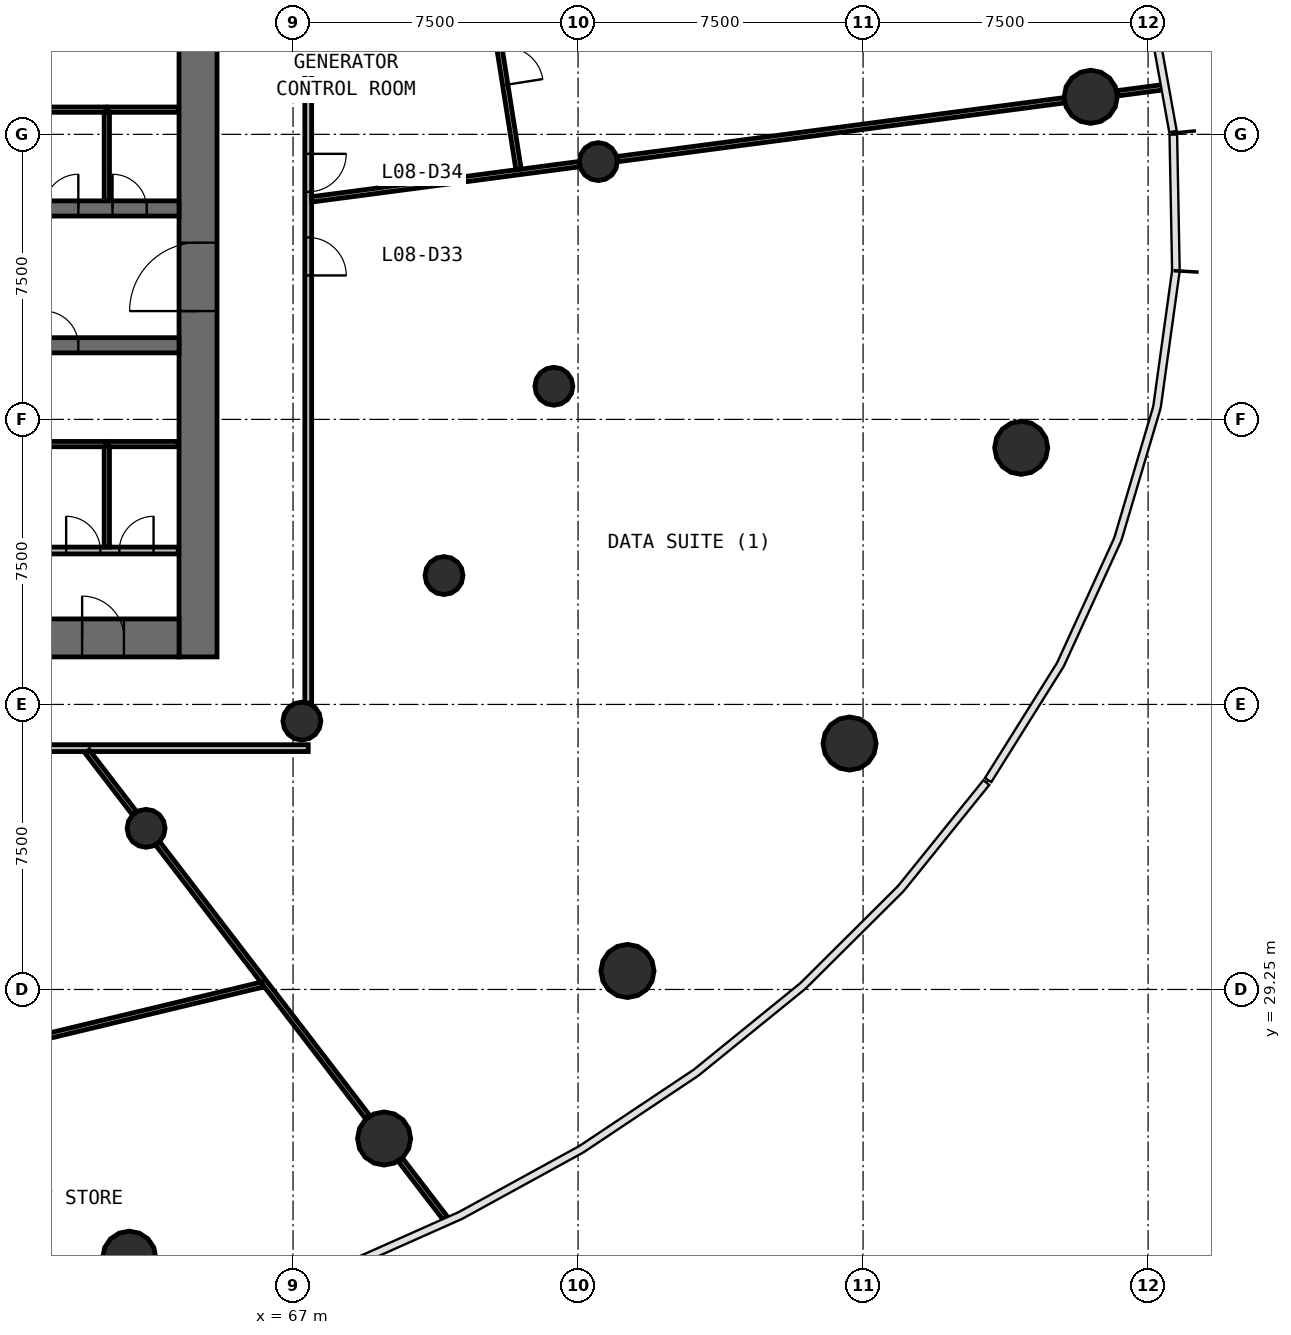
"""IFC4 building model, lengths in metres.
Left out: names, types, materials, properties, quantities, classifications, styles, units other than length and angle.
Written with IfcOpenShell. Run it as: python <this file> out.ifc"""

import sys

from ifc_helpers import new_model, si_unit, direction, frame, frame_2d, origin, origin_2d, place, context, subcontext, project, spatial, rectangle, circle, extrude, source, transform, mapped, element, fill, save


model = new_model("IFC4")
c1 = context("Model", 3, precision=1e-05, world=origin(), true_north=direction((0.0, 1.0)))
c2 = subcontext(c1, "Body", "Model", "MODEL_VIEW")
j1 = project(units=[si_unit("LENGTHUNIT", "METRE"), si_unit("PLANEANGLEUNIT", "RADIAN")], contexts=[c1])
p1 = place(None, origin())
s1 = spatial("IfcSite", under=j1, at=p1, CompositionType="ELEMENT")
p2 = place(p1, origin())
s2 = spatial("IfcBuilding", under=s1, at=p2, CompositionType="ELEMENT")
p3 = place(p2, frame((0.0, 0.0, 35.8)))
s3 = spatial("IfcBuildingStorey", under=s2, at=p3, CompositionType="ELEMENT", Elevation=35.8)
p4 = place(p3, frame((64.5, 38.0, 0.0), z_axis=(0.0, 0.0, 1.0), x_axis=(0.0, 1.0, 0.0)))
e1 = element("IfcWall", 1, at=p4, inside=s3, PredefinedType="SHEAR", context=c2, shape_type="SweptSolid", body=[
    extrude(rectangle(XDim=20.0, YDim=1.0, at=frame_2d((10.0, 0.0))), origin(), (0.0, 0.0, 1.0), 4.4),
])
p5 = place(p4, frame((9.1, 0.0, 0.0)))
e2 = element("IfcOpeningElement", 2, at=p5, cuts=e1, PredefinedType="OPENING", context=c2, shape_type="SweptSolid", body=[
    extrude(rectangle(XDim=1.8, YDim=2.1, at=frame_2d((0.9, 1.05))), frame((0.0, 0.51, 0.0), z_axis=(0.0, -1.0, 0.0), x_axis=(1.0, 0.0, 0.0)), (0.0, 0.0, 1.0), 1.02),
])
p6 = place(p3, frame((40.0, 38.5, 0.0), z_axis=(0.0, 0.0, 1.0), x_axis=(1.0, 0.0, 0.0)))
e3 = element("IfcWall", 3, at=p6, inside=s3, PredefinedType="SHEAR", context=c2, shape_type="SweptSolid", body=[
    extrude(rectangle(XDim=24.0, YDim=1.0, at=frame_2d((12.0, 0.0))), origin(), (0.0, 0.0, 1.0), 4.4),
])
p7 = place(p6, frame((21.45, 0.0, 0.0)))
e4 = element("IfcOpeningElement", 4, at=p7, cuts=e3, PredefinedType="OPENING", context=c2, shape_type="SweptSolid", body=[
    extrude(rectangle(XDim=1.1, YDim=2.1, at=frame_2d((0.55, 1.05))), frame((0.0, 0.51, 0.0), z_axis=(0.0, -1.0, 0.0), x_axis=(1.0, 0.0, 0.0)), (0.0, 0.0, 1.0), 1.02),
])
p8 = place(p6, frame((1.95, 0.0, 0.0)))
e5 = element("IfcOpeningElement", 5, at=p8, cuts=e3, PredefinedType="OPENING", context=c2, shape_type="SweptSolid", body=[
    extrude(rectangle(XDim=1.1, YDim=2.1, at=frame_2d((0.55, 1.05))), frame((0.0, 0.51, 0.0), z_axis=(0.0, -1.0, 0.0), x_axis=(1.0, 0.0, 0.0)), (0.0, 0.0, 1.0), 1.02),
])
p9 = place(p3, frame((40.0, 49.8, 0.0), z_axis=(0.0, 0.0, 1.0), x_axis=(1.0, 0.0, 0.0)))
e6 = element("IfcWall", 6, at=p9, inside=s3, PredefinedType="SHEAR", context=c2, shape_type="SweptSolid", body=[
    extrude(rectangle(XDim=24.0, YDim=0.4, at=frame_2d((12.0, 0.0))), origin(), (0.0, 0.0, 1.0), 4.4),
])
p10 = place(p9, frame((4.5, 0.0, 0.0)))
e7 = element("IfcOpeningElement", 7, at=p10, cuts=e6, PredefinedType="OPENING", context=c2, shape_type="SweptSolid", body=[
    extrude(rectangle(XDim=1.1, YDim=2.1, at=frame_2d((0.55, 1.05))), frame((0.0, 0.21, 0.0), z_axis=(0.0, -1.0, 0.0), x_axis=(1.0, 0.0, 0.0)), (0.0, 0.0, 1.0), 0.42),
])
p11 = place(p9, frame((7.0, 0.0, 0.0)))
e8 = element("IfcOpeningElement", 8, at=p11, cuts=e6, PredefinedType="OPENING", context=c2, shape_type="SweptSolid", body=[
    extrude(rectangle(XDim=1.1, YDim=2.1, at=frame_2d((0.55, 1.05))), frame((0.0, 0.21, 0.0), z_axis=(0.0, -1.0, 0.0), x_axis=(1.0, 0.0, 0.0)), (0.0, 0.0, 1.0), 0.42),
])
p12 = place(p9, frame((9.5, 0.0, 0.0)))
e9 = element("IfcOpeningElement", 9, at=p12, cuts=e6, PredefinedType="OPENING", context=c2, shape_type="SweptSolid", body=[
    extrude(rectangle(XDim=1.1, YDim=2.1, at=frame_2d((0.55, 1.05))), frame((0.0, 0.21, 0.0), z_axis=(0.0, -1.0, 0.0), x_axis=(1.0, 0.0, 0.0)), (0.0, 0.0, 1.0), 0.42),
])
p13 = place(p9, frame((0.9, 0.0, 0.0)))
e10 = element("IfcOpeningElement", 10, at=p13, cuts=e6, PredefinedType="OPENING", context=c2, shape_type="SweptSolid", body=[
    extrude(rectangle(XDim=1.8, YDim=2.4, at=frame_2d((0.9, 1.2))), frame((0.0, 0.21, 0.0), z_axis=(0.0, -1.0, 0.0), x_axis=(1.0, 0.0, 0.0)), (0.0, 0.0, 1.0), 0.42),
])
p14 = place(p9, frame((20.45, 0.0, 0.0)))
e11 = element("IfcOpeningElement", 11, at=p14, cuts=e6, PredefinedType="OPENING", context=c2, shape_type="SweptSolid", body=[
    extrude(rectangle(XDim=0.9, YDim=2.1, at=frame_2d((0.45, 1.05))), frame((0.0, 0.21, 0.0), z_axis=(0.0, -1.0, 0.0), x_axis=(1.0, 0.0, 0.0)), (0.0, 0.0, 1.0), 0.42),
])
p15 = place(p9, frame((22.25, 0.0, 0.0)))
e12 = element("IfcOpeningElement", 12, at=p15, cuts=e6, PredefinedType="OPENING", context=c2, shape_type="SweptSolid", body=[
    extrude(rectangle(XDim=0.9, YDim=2.1, at=frame_2d((0.45, 1.05))), frame((0.0, 0.21, 0.0), z_axis=(0.0, -1.0, 0.0), x_axis=(1.0, 0.0, 0.0)), (0.0, 0.0, 1.0), 0.42),
])
p16 = place(p9, frame((11.65, 0.0, 0.0)))
e13 = element("IfcOpeningElement", 13, at=p16, cuts=e6, PredefinedType="OPENING", context=c2, shape_type="SweptSolid", body=[
    extrude(rectangle(XDim=0.9, YDim=2.1, at=frame_2d((0.45, 1.05))), frame((0.0, 0.21, 0.0), z_axis=(0.0, -1.0, 0.0), x_axis=(1.0, 0.0, 0.0)), (0.0, 0.0, 1.0), 0.42),
])
p17 = place(p3, frame((40.0, 46.2, 0.0), z_axis=(0.0, 0.0, 1.0), x_axis=(1.0, 0.0, 0.0)))
e14 = element("IfcWall", 14, at=p17, inside=s3, PredefinedType="SHEAR", context=c2, shape_type="SweptSolid", body=[
    extrude(rectangle(XDim=24.0, YDim=0.4, at=frame_2d((12.0, 0.0))), origin(), (0.0, 0.0, 1.0), 4.4),
])
p18 = place(p17, frame((4.5, 0.0, 0.0)))
e15 = element("IfcOpeningElement", 15, at=p18, cuts=e14, PredefinedType="OPENING", context=c2, shape_type="SweptSolid", body=[
    extrude(rectangle(XDim=1.1, YDim=2.1, at=frame_2d((0.55, 1.05))), frame((0.0, 0.21, 0.0), z_axis=(0.0, -1.0, 0.0), x_axis=(1.0, 0.0, 0.0)), (0.0, 0.0, 1.0), 0.42),
])
p19 = place(p17, frame((7.0, 0.0, 0.0)))
e16 = element("IfcOpeningElement", 16, at=p19, cuts=e14, PredefinedType="OPENING", context=c2, shape_type="SweptSolid", body=[
    extrude(rectangle(XDim=1.1, YDim=2.1, at=frame_2d((0.55, 1.05))), frame((0.0, 0.21, 0.0), z_axis=(0.0, -1.0, 0.0), x_axis=(1.0, 0.0, 0.0)), (0.0, 0.0, 1.0), 0.42),
])
p20 = place(p17, frame((9.5, 0.0, 0.0)))
e17 = element("IfcOpeningElement", 17, at=p20, cuts=e14, PredefinedType="OPENING", context=c2, shape_type="SweptSolid", body=[
    extrude(rectangle(XDim=1.1, YDim=2.1, at=frame_2d((0.55, 1.05))), frame((0.0, 0.21, 0.0), z_axis=(0.0, -1.0, 0.0), x_axis=(1.0, 0.0, 0.0)), (0.0, 0.0, 1.0), 0.42),
])
p21 = place(p17, frame((20.45, 0.0, 0.0)))
e18 = element("IfcOpeningElement", 18, at=p21, cuts=e14, PredefinedType="OPENING", context=c2, shape_type="SweptSolid", body=[
    extrude(rectangle(XDim=0.9, YDim=2.1, at=frame_2d((0.45, 1.05))), frame((0.0, 0.21, 0.0), z_axis=(0.0, -1.0, 0.0), x_axis=(1.0, 0.0, 0.0)), (0.0, 0.0, 1.0), 0.42),
])
p22 = place(p17, frame((2.65, 0.0, 0.0)))
e19 = element("IfcOpeningElement", 19, at=p22, cuts=e14, PredefinedType="OPENING", context=c2, shape_type="SweptSolid", body=[
    extrude(rectangle(XDim=0.9, YDim=2.1, at=frame_2d((0.45, 1.05))), frame((0.0, 0.21, 0.0), z_axis=(0.0, -1.0, 0.0), x_axis=(1.0, 0.0, 0.0)), (0.0, 0.0, 1.0), 0.42),
])
p23 = place(p17, frame((11.65, 0.0, 0.0)))
e20 = element("IfcOpeningElement", 20, at=p23, cuts=e14, PredefinedType="OPENING", context=c2, shape_type="SweptSolid", body=[
    extrude(rectangle(XDim=0.9, YDim=2.1, at=frame_2d((0.45, 1.05))), frame((0.0, 0.21, 0.0), z_axis=(0.0, -1.0, 0.0), x_axis=(1.0, 0.0, 0.0)), (0.0, 0.0, 1.0), 0.42),
])
m1 = source(origin(), c2, "Body", "SweptSolid", [
    extrude(circle(Radius=0.7, at=origin_2d()), origin(), (0.0, 0.0, 1.0), 4.4),
])
for number, where, z_axis, x_axis in (
    (21, (87.99, 52.738, 0.0), (0.0, 0.0, 1.0), (1.0, 0.0, 0.0)),
    (22, (62.69, 22.191, 0.0), (0.0, 0.0, 1.0), (1.0, 0.0, 0.0)),
    (23, (69.396, 25.328, 0.0), (0.0, 0.0, 1.0), (1.0, 0.0, 0.0)),
    (24, (75.801, 29.737, 0.0), (0.0, 0.0, 1.0), (1.0, 0.0, 0.0)),
    (25, (81.645, 35.721, 0.0), (0.0, 0.0, 1.0), (1.0, 0.0, 0.0)),
    (26, (86.161, 43.503, 0.0), (0.0, 0.0, 1.0), (1.0, 0.0, 0.0)),
):
    element("IfcColumn", number, at=place(p3, frame(where, z_axis=z_axis, x_axis=x_axis)), inside=s3, PredefinedType="COLUMN", context=c2, shape_type="MappedRepresentation", body=[
        mapped(m1, transform((0.0, 0.0, 0.0), scale=1.0)),
    ])
m2 = source(origin(), c2, "Body", "SweptSolid", [
    extrude(circle(Radius=0.5, at=origin_2d()), origin(), (0.0, 0.0, 1.0), 4.4),
])
for number, where, z_axis, x_axis in (
    (27, (75.034, 51.032, 0.0), (0.0, 0.0, 1.0), (1.0, 0.0, 0.0)),
    (28, (63.134, 33.49, 0.0), (0.0, 0.0, 1.0), (1.0, 0.0, 0.0)),
    (29, (67.232, 36.312, 0.0), (0.0, 0.0, 1.0), (1.0, 0.0, 0.0)),
    (30, (70.972, 40.141, 0.0), (0.0, 0.0, 1.0), (1.0, 0.0, 0.0)),
    (31, (73.863, 45.122, 0.0), (0.0, 0.0, 1.0), (1.0, 0.0, 0.0)),
):
    element("IfcColumn", number, at=place(p3, frame(where, z_axis=z_axis, x_axis=x_axis)), inside=s3, PredefinedType="COLUMN", context=c2, shape_type="MappedRepresentation", body=[
        mapped(m2, transform((0.0, 0.0, 0.0), scale=1.0)),
    ])
p24 = place(p3, frame((67.4, 35.6, 0.0), z_axis=(0.0, 0.0, 1.0), x_axis=(-1.0, 0.0, 0.0)))
e32 = element("IfcWall", 32, at=p24, inside=s3, PredefinedType="PARTITIONING", context=c2, shape_type="SweptSolid", body=[
    extrude(rectangle(XDim=30.8, YDim=0.18, at=frame_2d((15.4, 0.0))), origin(), (0.0, 0.0, 1.0), 3.05),
])
p25 = place(p24, frame((14.95, 0.0, 0.0)))
e33 = element("IfcOpeningElement", 33, at=p25, cuts=e32, PredefinedType="OPENING", context=c2, shape_type="SweptSolid", body=[
    extrude(rectangle(XDim=1.0, YDim=2.1, at=frame_2d((0.5, 1.05))), frame((0.0, 0.1, 0.0), z_axis=(0.0, -1.0, 0.0), x_axis=(1.0, 0.0, 0.0)), (0.0, 0.0, 1.0), 0.2),
])
p26 = place(p24, frame((12.55, 0.0, 0.0)))
e34 = element("IfcOpeningElement", 34, at=p26, cuts=e32, PredefinedType="OPENING", context=c2, shape_type="SweptSolid", body=[
    extrude(rectangle(XDim=1.0, YDim=2.1, at=frame_2d((0.5, 1.05))), frame((0.0, 0.1, 0.0), z_axis=(0.0, -1.0, 0.0), x_axis=(1.0, 0.0, 0.0)), (0.0, 0.0, 1.0), 0.2),
])
p27 = place(p3, frame((67.4, 60.37, 0.0), z_axis=(0.0, 0.0, 1.0), x_axis=(0.0, -1.0, 0.0)))
e35 = element("IfcWall", 35, at=p27, inside=s3, PredefinedType="PARTITIONING", context=c2, shape_type="SweptSolid", body=[
    extrude(rectangle(XDim=23.583, YDim=0.18, at=frame_2d((11.791, 0.0))), origin(), (0.0, 0.0, 1.0), 3.05),
])
p28 = place(p27, frame((11.333, 0.0, 0.0)))
e36 = element("IfcOpeningElement", 36, at=p28, cuts=e35, PredefinedType="OPENING", context=c2, shape_type="SweptSolid", body=[
    extrude(rectangle(XDim=1.0, YDim=2.1, at=frame_2d((0.5, 1.05))), frame((0.0, 0.1, 0.0), z_axis=(0.0, -1.0, 0.0), x_axis=(1.0, 0.0, 0.0)), (0.0, 0.0, 1.0), 0.2),
])
p29 = place(p27, frame((9.133, 0.0, 0.0)))
e37 = element("IfcOpeningElement", 37, at=p29, cuts=e35, PredefinedType="OPENING", context=c2, shape_type="SweptSolid", body=[
    extrude(rectangle(XDim=1.0, YDim=2.1, at=frame_2d((0.5, 1.05))), frame((0.0, 0.1, 0.0), z_axis=(0.0, -1.0, 0.0), x_axis=(1.0, 0.0, 0.0)), (0.0, 0.0, 1.0), 0.2),
])
p30 = place(p3, frame((60.23, 40.8, 0.0), z_axis=(0.0, 0.0, 1.0), x_axis=(1.0, 0.0, 0.0)))
e38 = element("IfcWall", 38, at=p30, inside=s3, PredefinedType="PARTITIONING", context=c2, shape_type="SweptSolid", body=[
    extrude(rectangle(XDim=3.75, YDim=0.18, at=frame_2d((1.875, 0.0))), origin(), (0.0, 0.0, 1.0), 3.95),
])
p31 = place(p30, frame((0.8, 0.0, 0.0)))
e39 = element("IfcOpeningElement", 39, at=p31, cuts=e38, PredefinedType="OPENING", context=c2, shape_type="SweptSolid", body=[
    extrude(rectangle(XDim=0.9, YDim=2.1, at=frame_2d((0.45, 1.05))), frame((0.0, 0.1, 0.0), z_axis=(0.0, -1.0, 0.0), x_axis=(1.0, 0.0, 0.0)), (0.0, 0.0, 1.0), 0.2),
])
p32 = place(p30, frame((2.2, 0.0, 0.0)))
e40 = element("IfcOpeningElement", 40, at=p32, cuts=e38, PredefinedType="OPENING", context=c2, shape_type="SweptSolid", body=[
    extrude(rectangle(XDim=0.9, YDim=2.1, at=frame_2d((0.45, 1.05))), frame((0.0, 0.1, 0.0), z_axis=(0.0, -1.0, 0.0), x_axis=(1.0, 0.0, 0.0)), (0.0, 0.0, 1.0), 0.2),
])
p33 = place(p3, frame((75.534, 51.098, 0.0), z_axis=(0.0, 0.0, 1.0), x_axis=(0.991446586451, 0.130513088287, 0.0)))
e41 = element("IfcWall", 41, at=p33, inside=s3, PredefinedType="PARTITIONING", context=c2, shape_type="SweptSolid", body=[
    extrude(rectangle(XDim=11.86, YDim=0.14, at=frame_2d((5.93, 0.0))), origin(), (0.0, 0.0, 1.0), 3.05),
])
p34 = place(p3, frame((63.441, 33.09, 0.0), z_axis=(0.0, 0.0, 1.0), x_axis=(0.608770769454, -0.793346173028, 0.0)))
e42 = element("IfcWall", 42, at=p34, inside=s3, PredefinedType="PARTITIONING", context=c2, shape_type="SweptSolid", body=[
    extrude(rectangle(XDim=9.079, YDim=0.14, at=frame_2d((4.54, 0.0))), origin(), (0.0, 0.0, 1.0), 3.05),
])
p35 = place(p3, frame((74.534, 50.967, 0.0), z_axis=(0.0, 0.0, 1.0), x_axis=(-0.99144622305, -0.130515848849, 0.0)))
e43 = element("IfcWall", 43, at=p35, inside=s3, PredefinedType="PARTITIONING", context=c2, shape_type="SweptSolid", body=[
    extrude(rectangle(XDim=7.104, YDim=0.14, at=frame_2d((3.552, 0.0))), origin(), (0.0, 0.0, 1.0), 3.05),
])
p36 = place(p3, frame((60.299, 27.965, 0.0), z_axis=(0.0, 0.0, 1.0), x_axis=(0.972356247256, 0.233502309242, 0.0)))
e44 = element("IfcWall", 44, at=p36, inside=s3, PredefinedType="PARTITIONING", context=c2, shape_type="SweptSolid", body=[
    extrude(rectangle(XDim=6.067, YDim=0.14, at=frame_2d((3.034, 0.0))), origin(), (0.0, 0.0, 1.0), 3.05),
])
p37 = place(p3, frame((72.074, 56.283, 0.0), z_axis=(0.0, 0.0, 1.0), x_axis=(0.155785554146, -0.987790899492, 0.0)))
e45 = element("IfcWall", 45, at=p37, inside=s3, PredefinedType="PARTITIONING", context=c2, shape_type="SweptSolid", body=[
    extrude(rectangle(XDim=5.524, YDim=0.14, at=frame_2d((2.762, 0.0))), origin(), (0.0, 0.0, 1.0), 3.05),
])
p38 = place(p37, frame((2.274, 0.0, 0.0)))
e46 = element("IfcOpeningElement", 46, at=p38, cuts=e45, PredefinedType="OPENING", context=c2, shape_type="SweptSolid", body=[
    extrude(rectangle(XDim=1.0, YDim=2.1, at=frame_2d((0.5, 1.05))), frame((0.0, 0.08, 0.0), z_axis=(0.0, -1.0, 0.0), x_axis=(1.0, 0.0, 0.0)), (0.0, 0.0, 1.0), 0.16),
])
p39 = place(p3, frame((62.1, 40.89, 0.0), z_axis=(0.0, 0.0, 1.0), x_axis=(0.0, 1.0, 0.0)))
e47 = element("IfcWall", 47, at=p39, inside=s3, PredefinedType="PARTITIONING", context=c2, shape_type="SweptSolid", body=[
    extrude(rectangle(XDim=2.71, YDim=0.14, at=frame_2d((1.355, 0.0))), origin(), (0.0, 0.0, 1.0), 3.05),
])
p40 = place(p3, frame((62.1, 50.01, 0.0), z_axis=(0.0, 0.0, 1.0), x_axis=(0.0, 1.0, 0.0)))
e48 = element("IfcWall", 48, at=p40, inside=s3, PredefinedType="PARTITIONING", context=c2, shape_type="SweptSolid", body=[
    extrude(rectangle(XDim=2.39, YDim=0.14, at=frame_2d((1.195, 0.0))), origin(), (0.0, 0.0, 1.0), 3.05),
])
p41 = place(p3, frame((61.584, 35.51, 0.0), z_axis=(0.0, 0.0, 1.0), x_axis=(0.608727763541, -0.793379171578, 0.0)))
e49 = element("IfcWall", 49, at=p41, inside=s3, PredefinedType="PARTITIONING", context=c2, shape_type="SweptSolid", body=[
    extrude(rectangle(XDim=2.042, YDim=0.14, at=frame_2d((1.021, 0.0))), origin(), (0.0, 0.0, 1.0), 3.05),
])
p42 = place(p3, frame((69.825, 24.77, 0.0), z_axis=(0.0, 0.0, 1.0), x_axis=(0.608846424219, -0.793288113938, 0.0)))
e50 = element("IfcWall", 50, at=p42, inside=s3, PredefinedType="PARTITIONING", context=c2, shape_type="SweptSolid", body=[
    extrude(rectangle(XDim=1.939, YDim=0.14, at=frame_2d((0.97, 0.0))), origin(), (0.0, 0.0, 1.0), 3.05),
])
for number, where, z_axis, x_axis in (
    (51, (60.23, 43.6, 0.0), (0.0, 0.0, 1.0), (1.0, 0.0, 0.0)),
    (52, (62.07, 52.4, 0.0), (0.0, 0.0, 1.0), (-1.0, 0.0, 0.0)),
):
    element("IfcWall", number, at=place(p3, frame(where, z_axis=z_axis, x_axis=x_axis)), inside=s3, PredefinedType="PARTITIONING", context=c2, shape_type="SweptSolid", body=[
        extrude(rectangle(XDim=1.84, YDim=0.14, at=frame_2d((0.92, 0.0))), origin(), (0.0, 0.0, 1.0), 3.05),
    ])
for number, where, z_axis, x_axis in (
    (53, (62.13, 43.6, 0.0), (0.0, 0.0, 1.0), (1.0, 0.0, 0.0)),
    (54, (63.98, 52.4, 0.0), (0.0, 0.0, 1.0), (-1.0, 0.0, 0.0)),
):
    element("IfcWall", number, at=place(p3, frame(where, z_axis=z_axis, x_axis=x_axis)), inside=s3, PredefinedType="PARTITIONING", context=c2, shape_type="SweptSolid", body=[
        extrude(rectangle(XDim=1.85, YDim=0.14, at=frame_2d((0.925, 0.0))), origin(), (0.0, 0.0, 1.0), 3.05),
    ])
p43 = place(p3, frame((88.689, 52.83, 0.0), z_axis=(0.0, 0.0, 1.0), x_axis=(0.991431129538, 0.130630453508, 0.0)))
e55 = element("IfcWall", 55, at=p43, inside=s3, PredefinedType="PARTITIONING", context=c2, shape_type="SweptSolid", body=[
    extrude(rectangle(XDim=1.22, YDim=0.14, at=frame_2d((0.61, 0.0))), origin(), (0.0, 0.0, 1.0), 3.05),
])
m3 = source(origin(), c2, "Body", "SweptSolid", [
    extrude(rectangle(XDim=1.8, YDim=2.1, at=frame_2d((0.9, 1.05))), frame((0.0, 0.025, 0.0), z_axis=(0.0, -1.0, 0.0), x_axis=(1.0, 0.0, 0.0)), (0.0, 0.0, 1.0), 0.05),
])
p44 = place(p5, origin())
e56 = element("IfcDoor", 56, at=p44, inside=s3, OperationType="SINGLE_SWING_LEFT", PredefinedType="DOOR", context=c2, shape_type="MappedRepresentation", body=[
    mapped(m3, transform((0.0, 0.0, 0.0), scale=1.0)),
])
fill(e2, e56)
m4 = source(origin(), c2, "Body", "SweptSolid", [
    extrude(rectangle(XDim=1.1, YDim=2.1, at=frame_2d((0.55, 1.05))), frame((0.0, 0.025, 0.0), z_axis=(0.0, -1.0, 0.0), x_axis=(1.0, 0.0, 0.0)), (0.0, 0.0, 1.0), 0.05),
])
p45 = place(p7, origin())
e57 = element("IfcDoor", 57, at=p45, inside=s3, OperationType="SINGLE_SWING_LEFT", PredefinedType="DOOR", context=c2, shape_type="MappedRepresentation", body=[
    mapped(m4, transform((0.0, 0.0, 0.0), scale=1.0)),
])
fill(e4, e57)
m5 = source(origin(), c2, "Body", "SweptSolid", [
    extrude(rectangle(XDim=1.0, YDim=2.1, at=frame_2d((0.5, 1.05))), frame((0.0, 0.025, 0.0), z_axis=(0.0, -1.0, 0.0), x_axis=(1.0, 0.0, 0.0)), (0.0, 0.0, 1.0), 0.05),
])
p46 = place(p28, origin())
e58 = element("IfcDoor", 58, at=p46, inside=s3, OperationType="SINGLE_SWING_RIGHT", PredefinedType="DOOR", context=c2, shape_type="MappedRepresentation", body=[
    mapped(m5, transform((0.0, 0.0, 0.0), scale=1.0)),
])
fill(e36, e58)
p47 = place(p29, origin())
e59 = element("IfcDoor", 59, at=p47, inside=s3, OperationType="SINGLE_SWING_LEFT", PredefinedType="DOOR", context=c2, shape_type="MappedRepresentation", body=[
    mapped(m5, transform((0.0, 0.0, 0.0), scale=1.0)),
])
fill(e37, e59)
p48 = place(p38, origin())
e60 = element("IfcDoor", 60, at=p48, inside=s3, OperationType="SINGLE_SWING_RIGHT", PredefinedType="DOOR", context=c2, shape_type="MappedRepresentation", body=[
    mapped(m5, transform((0.0, 0.0, 0.0), scale=1.0)),
])
fill(e46, e60)
m6 = source(origin(), c2, "Body", "SweptSolid", [
    extrude(rectangle(XDim=0.9, YDim=2.1, at=frame_2d((0.45, 1.05))), frame((0.0, 0.025, 0.0), z_axis=(0.0, -1.0, 0.0), x_axis=(1.0, 0.0, 0.0)), (0.0, 0.0, 1.0), 0.05),
])
p49 = place(p21, origin())
e61 = element("IfcDoor", 61, at=p49, inside=s3, OperationType="SINGLE_SWING_LEFT", PredefinedType="DOOR", context=c2, shape_type="MappedRepresentation", body=[
    mapped(m6, transform((0.0, 0.0, 0.0), scale=1.0)),
])
fill(e18, e61)
p50 = place(p14, origin())
e62 = element("IfcDoor", 62, at=p50, inside=s3, OperationType="SINGLE_SWING_RIGHT", PredefinedType="DOOR", context=c2, shape_type="MappedRepresentation", body=[
    mapped(m6, transform((0.0, 0.0, 0.0), scale=1.0)),
])
fill(e11, e62)
p51 = place(p15, origin())
e63 = element("IfcDoor", 63, at=p51, inside=s3, OperationType="SINGLE_SWING_LEFT", PredefinedType="DOOR", context=c2, shape_type="MappedRepresentation", body=[
    mapped(m6, transform((0.0, 0.0, 0.0), scale=1.0)),
])
fill(e12, e63)
p52 = place(p31, origin())
e64 = element("IfcDoor", 64, at=p52, inside=s3, OperationType="SINGLE_SWING_LEFT", PredefinedType="DOOR", context=c2, shape_type="MappedRepresentation", body=[
    mapped(m6, transform((0.0, 0.0, 0.0), scale=1.0)),
])
fill(e39, e64)
p53 = place(p32, origin())
e65 = element("IfcDoor", 65, at=p53, inside=s3, OperationType="SINGLE_SWING_RIGHT", PredefinedType="DOOR", context=c2, shape_type="MappedRepresentation", body=[
    mapped(m6, transform((0.0, 0.0, 0.0), scale=1.0)),
])
fill(e40, e65)
save(model, sys.argv[1])
